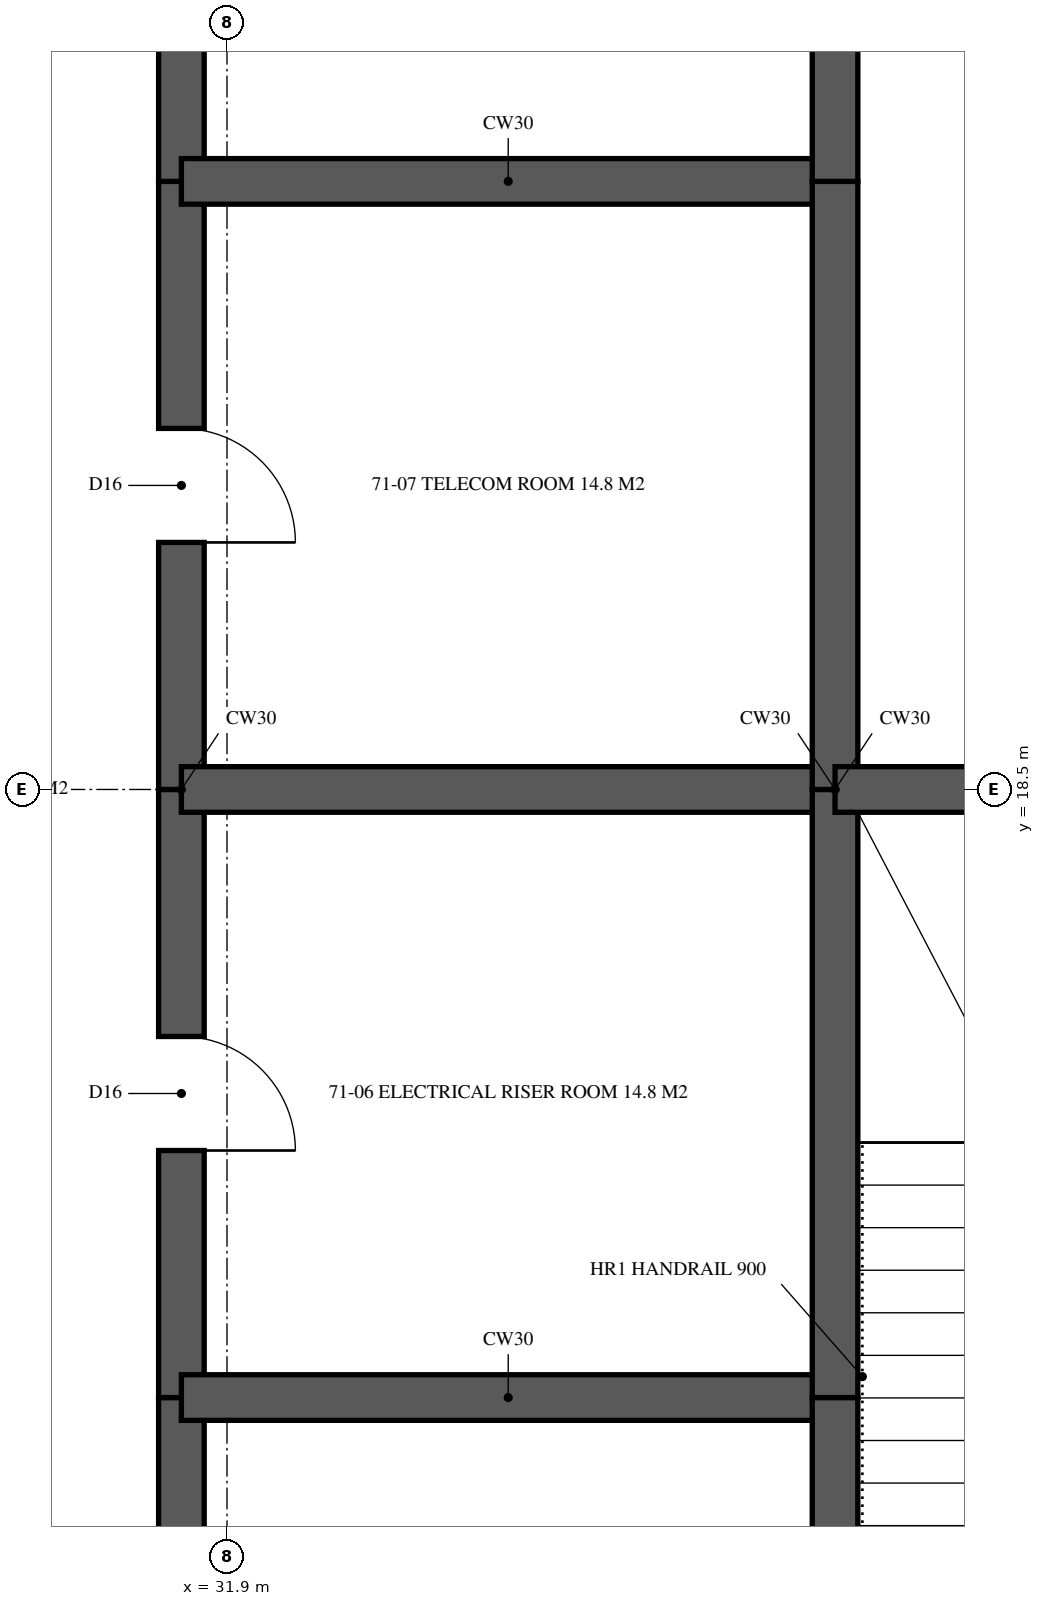
"""IFC4 building model, lengths in metres.
Left out: names, types, materials, properties, quantities, classifications, styles, units other than length and angle.
Written with IfcOpenShell. Run it as: python <this file> out.ifc"""

import sys

from ifc_helpers import new_model, si_unit, direction, frame, frame_2d, origin, place, context, subcontext, project, spatial, rectangle, extrude, element, fill, save


model = new_model("IFC4")
c1 = context("Model", 3, precision=1e-05, world=origin(), true_north=direction((0.0, 1.0)))
c2 = subcontext(c1, "Body", "Model", "MODEL_VIEW")
j1 = project(units=[si_unit("LENGTHUNIT", "METRE"), si_unit("PLANEANGLEUNIT", "RADIAN")], contexts=[c1])
p1 = place(None, origin())
s1 = spatial("IfcSite", under=j1, at=p1, CompositionType="ELEMENT")
p2 = place(p1, origin())
s2 = spatial("IfcBuilding", under=s1, at=p2, CompositionType="ELEMENT")
p3 = place(p2, frame((0.0, 0.0, 259.95)))
s3 = spatial("IfcBuildingStorey", under=s2, at=p3, CompositionType="ELEMENT", Elevation=259.95)
p4 = place(p3, frame((31.6, 10.675, 0.0), z_axis=(0.0, 0.0, 1.0), x_axis=(0.0, 1.0, 0.0)))
e1 = element("IfcWall", 1, at=p4, inside=s3, PredefinedType="SHEAR", context=c2, shape_type="SweptSolid", body=[
    extrude(rectangle(XDim=3.825, YDim=0.3, at=frame_2d((1.913, 0.0))), origin(), (0.0, 0.0, 1.0), 3.9),
])
p5 = place(p4, frame((1.45, 0.0, 0.0)))
e2 = element("IfcOpeningElement", 2, at=p5, cuts=e1, PredefinedType="OPENING", context=c2, shape_type="SweptSolid", body=[
    extrude(rectangle(XDim=0.75, YDim=2.1, at=frame_2d((0.375, 1.05))), frame((0.0, 0.16, 0.0), z_axis=(0.0, -1.0, 0.0), x_axis=(1.0, 0.0, 0.0)), (0.0, 0.0, 1.0), 0.32),
])
p6 = place(p3, frame((31.6, 14.5, 0.0), z_axis=(0.0, 0.0, 1.0), x_axis=(0.0, 1.0, 0.0)))
e3 = element("IfcWall", 3, at=p6, inside=s3, PredefinedType="SHEAR", context=c2, shape_type="SweptSolid", body=[
    extrude(rectangle(XDim=4.0, YDim=0.3, at=frame_2d((2.0, 0.0))), origin(), (0.0, 0.0, 1.0), 3.9),
])
p7 = place(p6, frame((1.625, 0.0, 0.0)))
e4 = element("IfcOpeningElement", 4, at=p7, cuts=e3, PredefinedType="OPENING", context=c2, shape_type="SweptSolid", body=[
    extrude(rectangle(XDim=0.75, YDim=2.1, at=frame_2d((0.375, 1.05))), frame((0.0, 0.16, 0.0), z_axis=(0.0, -1.0, 0.0), x_axis=(1.0, 0.0, 0.0)), (0.0, 0.0, 1.0), 0.32),
])
p8 = place(p3, frame((31.6, 18.5, 0.0), z_axis=(0.0, 0.0, 1.0), x_axis=(0.0, 1.0, 0.0)))
e5 = element("IfcWall", 5, at=p8, inside=s3, PredefinedType="SHEAR", context=c2, shape_type="SweptSolid", body=[
    extrude(rectangle(XDim=4.0, YDim=0.3, at=frame_2d((2.0, 0.0))), origin(), (0.0, 0.0, 1.0), 3.9),
])
p9 = place(p8, frame((1.625, 0.0, 0.0)))
e6 = element("IfcOpeningElement", 6, at=p9, cuts=e5, PredefinedType="OPENING", context=c2, shape_type="SweptSolid", body=[
    extrude(rectangle(XDim=0.75, YDim=2.1, at=frame_2d((0.375, 1.05))), frame((0.0, 0.16, 0.0), z_axis=(0.0, -1.0, 0.0), x_axis=(1.0, 0.0, 0.0)), (0.0, 0.0, 1.0), 0.32),
])
p10 = place(p3, frame((31.6, 22.5, 0.0), z_axis=(0.0, 0.0, 1.0), x_axis=(0.0, 1.0, 0.0)))
e7 = element("IfcWall", 7, at=p10, inside=s3, PredefinedType="SHEAR", context=c2, shape_type="SweptSolid", body=[
    extrude(rectangle(XDim=3.825, YDim=0.3, at=frame_2d((1.913, 0.0))), origin(), (0.0, 0.0, 1.0), 3.9),
])
p11 = place(p10, frame((1.625, 0.0, 0.0)))
e8 = element("IfcOpeningElement", 8, at=p11, cuts=e7, PredefinedType="OPENING", context=c2, shape_type="SweptSolid", body=[
    extrude(rectangle(XDim=0.75, YDim=2.1, at=frame_2d((0.375, 1.05))), frame((0.0, 0.16, 0.0), z_axis=(0.0, -1.0, 0.0), x_axis=(1.0, 0.0, 0.0)), (0.0, 0.0, 1.0), 0.32),
])
p12 = place(p3, frame((35.9, 10.675, 0.0), z_axis=(0.0, 0.0, 1.0), x_axis=(0.0, 1.0, 0.0)))
e9 = element("IfcWall", 9, at=p12, inside=s3, PredefinedType="SHEAR", context=c2, shape_type="SweptSolid", body=[
    extrude(rectangle(XDim=3.825, YDim=0.3, at=frame_2d((1.913, 0.0))), origin(), (0.0, 0.0, 1.0), 3.9),
])
for number, where, z_axis, x_axis in (
    (10, (35.9, 14.5, 0.0), (0.0, 0.0, 1.0), (0.0, 1.0, 0.0)),
    (11, (35.9, 18.5, 0.0), (0.0, 0.0, 1.0), (0.0, 1.0, 0.0)),
):
    element("IfcWall", number, at=place(p3, frame(where, z_axis=z_axis, x_axis=x_axis)), inside=s3, PredefinedType="SHEAR", context=c2, shape_type="SweptSolid", body=[
        extrude(rectangle(XDim=4.0, YDim=0.3, at=frame_2d((2.0, 0.0))), origin(), (0.0, 0.0, 1.0), 3.9),
    ])
p13 = place(p3, frame((35.9, 22.5, 0.0), z_axis=(0.0, 0.0, 1.0), x_axis=(0.0, 1.0, 0.0)))
e12 = element("IfcWall", 12, at=p13, inside=s3, PredefinedType="SHEAR", context=c2, shape_type="SweptSolid", body=[
    extrude(rectangle(XDim=3.825, YDim=0.3, at=frame_2d((1.913, 0.0))), origin(), (0.0, 0.0, 1.0), 3.9),
])
for number, where, z_axis, x_axis in (
    (13, (31.6, 14.5, 0.0), (0.0, 0.0, 1.0), (1.0, 0.0, 0.0)),
    (14, (31.6, 18.5, 0.0), (0.0, 0.0, 1.0), (1.0, 0.0, 0.0)),
    (15, (31.6, 22.5, 0.0), (0.0, 0.0, 1.0), (1.0, 0.0, 0.0)),
):
    element("IfcWall", number, at=place(p3, frame(where, z_axis=z_axis, x_axis=x_axis)), inside=s3, PredefinedType="SHEAR", context=c2, shape_type="SweptSolid", body=[
        extrude(rectangle(XDim=4.3, YDim=0.3, at=frame_2d((2.15, 0.0))), origin(), (0.0, 0.0, 1.0), 3.9),
    ])
p14 = place(p3, frame((35.9, 18.5, 0.0), z_axis=(0.0, 0.0, 1.0), x_axis=(1.0, 0.0, 0.0)))
e16 = element("IfcWall", 16, at=p14, inside=s3, PredefinedType="SHEAR", context=c2, shape_type="SweptSolid", body=[
    extrude(rectangle(XDim=4.3, YDim=0.3, at=frame_2d((2.15, 0.0))), origin(), (0.0, 0.0, 1.0), 3.9),
])
p15 = place(p7, frame((0.75, 0.0, 0.0), z_axis=(0.0, 0.0, 1.0), x_axis=(-1.0, 0.0, 0.0)))
e17 = element("IfcDoor", 17, at=p15, inside=s3, OperationType="SINGLE_SWING_RIGHT", PredefinedType="DOOR", context=c2, shape_type="SweptSolid", body=[
    extrude(rectangle(XDim=0.75, YDim=2.1, at=frame_2d((0.375, 1.05))), frame((0.0, 0.025, 0.0), z_axis=(0.0, -1.0, 0.0), x_axis=(1.0, 0.0, 0.0)), (0.0, 0.0, 1.0), 0.05),
])
fill(e4, e17)
p16 = place(p9, frame((0.75, 0.0, 0.0), z_axis=(0.0, 0.0, 1.0), x_axis=(-1.0, 0.0, 0.0)))
e18 = element("IfcDoor", 18, at=p16, inside=s3, OperationType="SINGLE_SWING_RIGHT", PredefinedType="DOOR", context=c2, shape_type="SweptSolid", body=[
    extrude(rectangle(XDim=0.75, YDim=2.1, at=frame_2d((0.375, 1.05))), frame((0.0, 0.025, 0.0), z_axis=(0.0, -1.0, 0.0), x_axis=(1.0, 0.0, 0.0)), (0.0, 0.0, 1.0), 0.05),
])
fill(e6, e18)
save(model, sys.argv[1])
